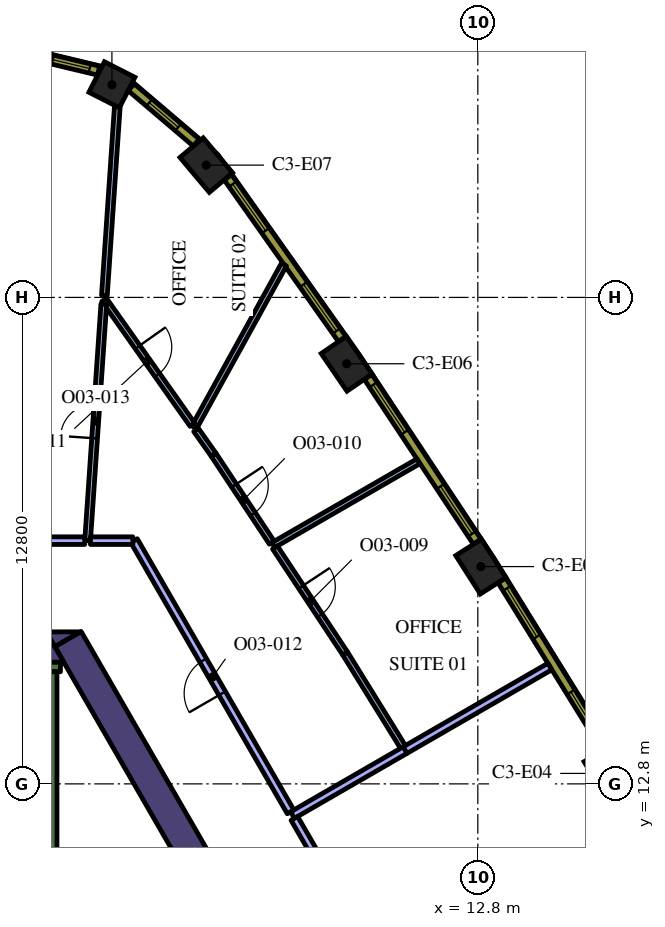
"""IFC4 building model, lengths in metres.
Left out: names, types, materials, properties, quantities, classifications, styles, units other than length and angle.
Written with IfcOpenShell. Run it as: python <this file> out.ifc"""

import sys

from ifc_helpers import new_model, si_unit, direction, frame, frame_2d, origin, origin_2d, place, context, subcontext, project, spatial, polyline, rectangle, outline, extrude, element, fill, save


model = new_model("IFC4")
c1 = context("Model", 3, precision=1e-05, world=origin(), true_north=direction((0.0, 1.0)))
c2 = subcontext(c1, "Body", "Model", "MODEL_VIEW")
j1 = project(units=[si_unit("LENGTHUNIT", "METRE"), si_unit("PLANEANGLEUNIT", "RADIAN")], contexts=[c1])
p1 = place(None, origin())
s1 = spatial("IfcSite", under=j1, at=p1, CompositionType="ELEMENT")
p2 = place(p1, origin())
s2 = spatial("IfcBuilding", under=s1, at=p2, CompositionType="ELEMENT")
p3 = place(p2, frame((0.0, 0.0, 171.0)))
s3 = spatial("IfcBuildingStorey", under=s2, at=p3, CompositionType="ELEMENT", Elevation=171.0)
for number, where, z_axis, x_axis in (
    (1, (16.247, 13.075, 0.0), (0.0, 0.0, 1.0), (-0.513, 0.858, 0.0)),
    (2, (12.88, 18.517, 0.0), (0.0, 0.0, 1.0), (-0.539, 0.842, 0.0)),
    (3, (9.348, 23.854, 0.0), (0.0, 0.0, 1.0), (-0.565, 0.825, 0.0)),
    (4, (5.654, 29.081, 0.0), (0.0, 0.0, 1.0), (-0.644, 0.765, 0.0)),
):
    element("IfcColumn", number, at=place(p3, frame(where, z_axis=z_axis, x_axis=x_axis)), inside=s3, PredefinedType="COLUMN", context=c2, shape_type="SweptSolid", body=[
        extrude(rectangle(XDim=1.2, YDim=0.8, at=origin_2d()), origin(), (0.0, 0.0, 1.0), 4.2),
    ])
p4 = place(p3, frame((3.171, 31.195, 0.0), z_axis=(0.0, 0.0, 1.0), x_axis=(-0.891486197647, 0.453047855535, 0.0)))
e5 = element("IfcColumn", 5, at=p4, inside=s3, PredefinedType="COLUMN", context=c2, shape_type="SweptSolid", body=[
    extrude(rectangle(XDim=0.9, YDim=0.9, at=origin_2d()), origin(), (0.0, 0.0, 1.0), 4.2),
])
p5 = place(p3, frame((8.279, 5.761, 0.0), z_axis=(0.0, 0.0, 1.0), x_axis=(-0.500010359015, 0.866019422922, 0.0)))
e6 = element("IfcWall", 6, at=p5, inside=s3, PredefinedType="SOLIDWALL", context=c2, shape_type="SweptSolid", body=[
    extrude(rectangle(XDim=12.528, YDim=0.8, at=frame_2d((6.264, 0.0))), origin(), (0.0, 0.0, 1.0), 4.2),
])
p6 = place(p3, origin())
e7 = element("IfcWall", 7, at=p6, inside=s3, PredefinedType="SOLIDWALL", context=c2, shape_type="SweptSolid", body=[
    extrude(outline(polyline([(1.443, 16.8), (2.339, 16.8), (1.667, 16.412), (1.443, 16.8)])), origin(), (0.0, 0.0, 1.0), 4.2),
])
e8 = element("IfcWall", 8, at=p6, inside=s3, PredefinedType="SOLIDWALL", context=c2, shape_type="SweptSolid", body=[
    extrude(outline(polyline([(1.905, 16.0), (1.447, 16.0), (1.447, 16.793), (1.905, 16.0)])), origin(), (0.0, 0.0, 1.0), 4.2),
])
p7 = place(p3, frame((-1.817, 15.875, 0.0), z_axis=(0.0, 0.0, 1.0), x_axis=(1.0, 0.0, 0.0)))
e9 = element("IfcWall", 9, at=p7, inside=s3, PredefinedType="SOLIDWALL", context=c2, shape_type="SweptSolid", body=[
    extrude(rectangle(XDim=3.634, YDim=0.25, at=frame_2d((1.817, 0.0))), origin(), (0.0, 0.0, 1.0), 4.2),
])
p8 = place(p3, frame((1.6, 8.95, 0.0), z_axis=(0.0, 0.0, 1.0), x_axis=(0.0, 1.0, 0.0)))
e10 = element("IfcWall", 10, at=p8, inside=s3, PredefinedType="SOLIDWALL", context=c2, shape_type="SweptSolid", body=[
    extrude(rectangle(XDim=6.8, YDim=0.25, at=frame_2d((3.4, 0.0))), origin(), (0.0, 0.0, 1.0), 4.2),
])
p9 = place(p3, frame((10.879, 13.685, 0.0), z_axis=(0.0, 0.0, 1.0), x_axis=(0.866035177799, 0.499983070528, 0.0)))
e11 = element("IfcWall", 11, at=p9, inside=s3, PredefinedType="PARTITIONING", context=c2, shape_type="SweptSolid", body=[
    extrude(rectangle(XDim=4.406, YDim=0.2, at=frame_2d((2.203, 0.0))), origin(), (0.0, 0.0, 1.0), 3.15),
])
p10 = place(p3, frame((7.922, 11.978, 0.0), z_axis=(0.0, 0.0, 1.0), x_axis=(0.866008564848, 0.50002916476, 0.0)))
e12 = element("IfcWall", 12, at=p10, inside=s3, PredefinedType="PARTITIONING", context=c2, shape_type="SweptSolid", body=[
    extrude(rectangle(XDim=3.422, YDim=0.2, at=frame_2d((1.711, 0.0))), origin(), (0.0, 0.0, 1.0), 3.15),
])
p11 = place(p3, frame((9.111, 9.918, 0.0), z_axis=(0.0, 0.0, 1.0), x_axis=(-0.499954382462, 0.86605173948, 0.0)))
e13 = element("IfcWall", 13, at=p11, inside=s3, PredefinedType="PARTITIONING", context=c2, shape_type="SweptSolid", body=[
    extrude(rectangle(XDim=2.278, YDim=0.2, at=frame_2d((1.139, 0.0))), origin(), (0.0, 0.0, 1.0), 3.15),
])
p12 = place(p3, frame((7.42, 19.085, 0.0), z_axis=(0.0, 0.0, 1.0), x_axis=(0.866012184407, 0.500022895934, 0.0)))
e14 = element("IfcWall", 14, at=p12, inside=s3, PredefinedType="PARTITIONING", context=c2, shape_type="SweptSolid", body=[
    extrude(rectangle(XDim=4.408, YDim=0.15, at=frame_2d((2.204, 0.0))), origin(), (0.0, 0.0, 1.0), 3.15),
])
p13 = place(p3, frame((10.83, 13.772, 0.0), z_axis=(0.0, 0.0, 1.0), x_axis=(-0.526229630206, 0.850342505284, 0.0)))
e15 = element("IfcWall", 15, at=p13, inside=s3, PredefinedType="PARTITIONING", context=c2, shape_type="SweptSolid", body=[
    extrude(rectangle(XDim=2.892, YDim=0.15, at=frame_2d((1.446, 0.0))), origin(), (0.0, 0.0, 1.0), 3.15),
])
p14 = place(p3, frame((7.461, 19.022, 0.0), z_axis=(0.0, 0.0, 1.0), x_axis=(0.551902709159, -0.833908507945, 0.0)))
e16 = element("IfcWall", 16, at=p14, inside=s3, PredefinedType="PARTITIONING", context=c2, shape_type="SweptSolid", body=[
    extrude(rectangle(XDim=3.347, YDim=0.15, at=frame_2d((1.673, 0.0))), origin(), (0.0, 0.0, 1.0), 3.15),
])
p15 = place(p14, frame((1.247, 0.0, 0.0)))
e17 = element("IfcOpeningElement", 17, at=p15, cuts=e16, PredefinedType="OPENING", context=c2, shape_type="SweptSolid", body=[
    extrude(rectangle(XDim=0.9, YDim=2.1, at=frame_2d((0.45, 1.05))), frame((0.0, 0.085, 0.0), z_axis=(0.0, -1.0, 0.0), x_axis=(1.0, 0.0, 0.0)), (0.0, 0.0, 1.0), 0.17),
])
p16 = place(p3, frame((5.337, 22.183, 0.0), z_axis=(0.0, 0.0, 1.0), x_axis=(0.482995509385, 0.875622828571, 0.0)))
e18 = element("IfcWall", 18, at=p16, inside=s3, PredefinedType="PARTITIONING", context=c2, shape_type="SweptSolid", body=[
    extrude(rectangle(XDim=4.89, YDim=0.15, at=frame_2d((2.445, 0.0))), origin(), (0.0, 0.0, 1.0), 3.15),
])
p17 = place(p3, frame((5.848, 21.46, 0.0), z_axis=(0.0, 0.0, 1.0), x_axis=(0.551934419249, -0.833887520502, 0.0)))
e19 = element("IfcWall", 19, at=p17, inside=s3, PredefinedType="PARTITIONING", context=c2, shape_type="SweptSolid", body=[
    extrude(rectangle(XDim=2.773, YDim=0.15, at=frame_2d((1.387, 0.0))), origin(), (0.0, 0.0, 1.0), 3.15),
])
p18 = place(p17, frame((0.973, 0.0, 0.0)))
e20 = element("IfcOpeningElement", 20, at=p18, cuts=e19, PredefinedType="OPENING", context=c2, shape_type="SweptSolid", body=[
    extrude(rectangle(XDim=0.9, YDim=2.1, at=frame_2d((0.45, 1.05))), frame((0.0, 0.085, 0.0), z_axis=(0.0, -1.0, 0.0), x_axis=(1.0, 0.0, 0.0)), (0.0, 0.0, 1.0), 0.17),
])
p19 = place(p3, frame((5.848, 21.46, 0.0), z_axis=(0.0, 0.0, 1.0), x_axis=(-0.577113333385, 0.816664068286, 0.0)))
e21 = element("IfcWall", 21, at=p19, inside=s3, PredefinedType="PARTITIONING", context=c2, shape_type="SweptSolid", body=[
    extrude(rectangle(XDim=0.802, YDim=0.15, at=frame_2d((0.401, 0.0))), origin(), (0.0, 0.0, 1.0), 3.15),
])
p20 = place(p3, frame((2.966, 25.539, 0.0), z_axis=(0.0, 0.0, 1.0), x_axis=(0.577099839594, -0.816673603798, 0.0)))
e22 = element("IfcWall", 22, at=p20, inside=s3, PredefinedType="PARTITIONING", context=c2, shape_type="SweptSolid", body=[
    extrude(rectangle(XDim=4.025, YDim=0.15, at=frame_2d((2.013, 0.0))), origin(), (0.0, 0.0, 1.0), 3.15),
])
p21 = place(p20, frame((1.525, 0.0, 0.0)))
e23 = element("IfcOpeningElement", 23, at=p21, cuts=e22, PredefinedType="OPENING", context=c2, shape_type="SweptSolid", body=[
    extrude(rectangle(XDim=0.9, YDim=2.1, at=frame_2d((0.45, 1.05))), frame((0.0, 0.085, 0.0), z_axis=(0.0, -1.0, 0.0), x_axis=(1.0, 0.0, 0.0)), (0.0, 0.0, 1.0), 0.17),
])
p22 = place(p3, frame((2.974, 25.657, 0.0), z_axis=(0.0, 0.0, 1.0), x_axis=(0.068301586051, 0.997664719905, 0.0)))
e24 = element("IfcWall", 24, at=p22, inside=s3, PredefinedType="PARTITIONING", context=c2, shape_type="SweptSolid", body=[
    extrude(rectangle(XDim=4.972, YDim=0.15, at=frame_2d((2.486, 0.0))), origin(), (0.0, 0.0, 1.0), 3.15),
])
p23 = place(p3, frame((2.531, 19.2, 0.0), z_axis=(0.0, 0.0, 1.0), x_axis=(0.06832771358, 0.997662930832, 0.0)))
e25 = element("IfcWall", 25, at=p23, inside=s3, PredefinedType="PARTITIONING", context=c2, shape_type="SweptSolid", body=[
    extrude(rectangle(XDim=6.235, YDim=0.15, at=frame_2d((3.118, 0.0))), origin(), (0.0, 0.0, 1.0), 3.15),
])
p24 = place(p23, frame((2.7, 0.0, 0.0)))
e26 = element("IfcOpeningElement", 26, at=p24, cuts=e25, PredefinedType="OPENING", context=c2, shape_type="SweptSolid", body=[
    extrude(rectangle(XDim=0.9, YDim=2.1, at=frame_2d((0.45, 1.05))), frame((0.0, 0.085, 0.0), z_axis=(0.0, -1.0, 0.0), x_axis=(1.0, 0.0, 0.0)), (0.0, 0.0, 1.0), 0.17),
])
p25 = place(p3, frame((7.872, 12.064, 0.0), z_axis=(0.0, 0.0, 1.0), x_axis=(-0.499995192696, 0.866028179265, 0.0)))
e27 = element("IfcWall", 27, at=p25, inside=s3, PredefinedType="PARTITIONING", context=c2, shape_type="SweptSolid", body=[
    extrude(rectangle(XDim=8.239, YDim=0.2, at=frame_2d((4.12, 0.0))), origin(), (0.0, 0.0, 1.0), 3.15),
])
p26 = place(p25, frame((3.6, 0.0, 0.0)))
e28 = element("IfcOpeningElement", 28, at=p26, cuts=e27, PredefinedType="OPENING", context=c2, shape_type="SweptSolid", body=[
    extrude(rectangle(XDim=1.0, YDim=2.1, at=frame_2d((0.5, 1.05))), frame((0.0, 0.11, 0.0), z_axis=(0.0, -1.0, 0.0), x_axis=(1.0, 0.0, 0.0)), (0.0, 0.0, 1.0), 0.22),
])
p27 = place(p3, frame((3.723, 19.2, 0.0), z_axis=(0.0, 0.0, 1.0), x_axis=(-1.0, 0.0, 0.0)))
e29 = element("IfcWall", 29, at=p27, inside=s3, PredefinedType="PARTITIONING", context=c2, shape_type="SweptSolid", body=[
    extrude(rectangle(XDim=1.116, YDim=0.2, at=frame_2d((0.558, 0.0))), origin(), (0.0, 0.0, 1.0), 3.15),
])
p28 = place(p3, frame((2.456, 19.2, 0.0), z_axis=(0.0, 0.0, 1.0), x_axis=(-1.0, 0.0, 0.0)))
e30 = element("IfcWall", 30, at=p28, inside=s3, PredefinedType="PARTITIONING", context=c2, shape_type="SweptSolid", body=[
    extrude(rectangle(XDim=5.41, YDim=0.2, at=frame_2d((2.705, 0.0))), origin(), (0.0, 0.0, 1.0), 3.15),
])
p29 = place(p3, frame((16.171, 13.731, 0.0), z_axis=(0.0, 0.0, 1.0), x_axis=(-0.526197926587, 0.850362124072, 0.0)))
e31 = element("IfcWall", 31, at=p29, inside=s3, PredefinedType="SOLIDWALL", context=c2, shape_type="SweptSolid", body=[
    extrude(rectangle(XDim=5.203, YDim=0.24, at=frame_2d((2.602, 0.0))), origin(), (0.0, 0.0, 1.0), 3.95),
])
p30 = place(p29, frame((0.248, 0.0, 0.9)))
e32 = element("IfcOpeningElement", 32, at=p30, cuts=e31, PredefinedType="OPENING", context=c2, shape_type="SweptSolid", body=[
    extrude(rectangle(XDim=1.5, YDim=2.55, at=frame_2d((0.75, 1.275))), frame((0.0, 0.13, 0.0), z_axis=(0.0, -1.0, 0.0), x_axis=(1.0, 0.0, 0.0)), (0.0, 0.0, 1.0), 0.26),
])
p31 = place(p29, frame((3.455, 0.0, 0.9)))
e33 = element("IfcOpeningElement", 33, at=p31, cuts=e31, PredefinedType="OPENING", context=c2, shape_type="SweptSolid", body=[
    extrude(rectangle(XDim=1.5, YDim=2.55, at=frame_2d((0.75, 1.275))), frame((0.0, 0.13, 0.0), z_axis=(0.0, -1.0, 0.0), x_axis=(1.0, 0.0, 0.0)), (0.0, 0.0, 1.0), 0.26),
])
p32 = place(p3, frame((12.783, 19.171, 0.0), z_axis=(0.0, 0.0, 1.0), x_axis=(-0.551892811511, 0.833915058386, 0.0)))
e34 = element("IfcWall", 34, at=p32, inside=s3, PredefinedType="SOLIDWALL", context=c2, shape_type="SweptSolid", body=[
    extrude(rectangle(XDim=5.204, YDim=0.24, at=frame_2d((2.602, 0.0))), origin(), (0.0, 0.0, 1.0), 3.95),
])
p33 = place(p32, frame((0.248, 0.0, 0.9)))
e35 = element("IfcOpeningElement", 35, at=p33, cuts=e34, PredefinedType="OPENING", context=c2, shape_type="SweptSolid", body=[
    extrude(rectangle(XDim=1.5, YDim=2.55, at=frame_2d((0.75, 1.275))), frame((0.0, 0.13, 0.0), z_axis=(0.0, -1.0, 0.0), x_axis=(1.0, 0.0, 0.0)), (0.0, 0.0, 1.0), 0.26),
])
p34 = place(p32, frame((3.455, 0.0, 0.9)))
e36 = element("IfcOpeningElement", 36, at=p34, cuts=e34, PredefinedType="OPENING", context=c2, shape_type="SweptSolid", body=[
    extrude(rectangle(XDim=1.5, YDim=2.55, at=frame_2d((0.75, 1.275))), frame((0.0, 0.13, 0.0), z_axis=(0.0, -1.0, 0.0), x_axis=(1.0, 0.0, 0.0)), (0.0, 0.0, 1.0), 0.26),
])
p35 = place(p3, frame((9.231, 24.504, 0.0), z_axis=(0.0, 0.0, 1.0), x_axis=(-0.577115207679, 0.816662743772, 0.0)))
e37 = element("IfcWall", 37, at=p35, inside=s3, PredefinedType="SOLIDWALL", context=c2, shape_type="SweptSolid", body=[
    extrude(rectangle(XDim=5.213, YDim=0.24, at=frame_2d((2.606, 0.0))), origin(), (0.0, 0.0, 1.0), 3.95),
])
p36 = place(p35, frame((0.261, 0.0, 0.9)))
e38 = element("IfcOpeningElement", 38, at=p36, cuts=e37, PredefinedType="OPENING", context=c2, shape_type="SweptSolid", body=[
    extrude(rectangle(XDim=1.5, YDim=2.55, at=frame_2d((0.75, 1.275))), frame((0.0, 0.13, 0.0), z_axis=(0.0, -1.0, 0.0), x_axis=(1.0, 0.0, 0.0)), (0.0, 0.0, 1.0), 0.26),
])
p37 = place(p35, frame((3.492, 0.0, 0.9)))
e39 = element("IfcOpeningElement", 39, at=p37, cuts=e37, PredefinedType="OPENING", context=c2, shape_type="SweptSolid", body=[
    extrude(rectangle(XDim=1.5, YDim=2.55, at=frame_2d((0.75, 1.275))), frame((0.0, 0.13, 0.0), z_axis=(0.0, -1.0, 0.0), x_axis=(1.0, 0.0, 0.0)), (0.0, 0.0, 1.0), 0.26),
])
p38 = place(p3, frame((5.392, 29.672, 0.0), z_axis=(0.0, 0.0, 1.0), x_axis=(-0.761419744247, 0.648259186645, 0.0)))
e40 = element("IfcWall", 40, at=p38, inside=s3, PredefinedType="SOLIDWALL", context=c2, shape_type="SweptSolid", body=[
    extrude(rectangle(XDim=2.25, YDim=0.24, at=frame_2d((1.125, 0.0))), origin(), (0.0, 0.0, 1.0), 3.95),
])
p39 = place(p38, frame((0.625, 0.0, 0.9)))
e41 = element("IfcOpeningElement", 41, at=p39, cuts=e40, PredefinedType="OPENING", context=c2, shape_type="SweptSolid", body=[
    extrude(rectangle(XDim=1.0, YDim=2.55, at=frame_2d((0.5, 1.275))), frame((0.0, 0.13, 0.0), z_axis=(0.0, -1.0, 0.0), x_axis=(1.0, 0.0, 0.0)), (0.0, 0.0, 1.0), 0.26),
])
p40 = place(p3, frame((2.821, 31.566, 0.0), z_axis=(0.0, 0.0, 1.0), x_axis=(-0.972479955788, 0.232986556673, 0.0)))
e42 = element("IfcWall", 42, at=p40, inside=s3, PredefinedType="SOLIDWALL", context=c2, shape_type="SweptSolid", body=[
    extrude(rectangle(XDim=1.482, YDim=0.24, at=frame_2d((0.741, 0.0))), origin(), (0.0, 0.0, 1.0), 3.95),
])
p41 = place(p40, frame((0.241, 0.0, 0.9)))
e43 = element("IfcOpeningElement", 43, at=p41, cuts=e42, PredefinedType="OPENING", context=c2, shape_type="SweptSolid", body=[
    extrude(rectangle(XDim=1.0, YDim=2.55, at=frame_2d((0.5, 1.275))), frame((0.0, 0.13, 0.0), z_axis=(0.0, -1.0, 0.0), x_axis=(1.0, 0.0, 0.0)), (0.0, 0.0, 1.0), 0.26),
])
p42 = place(p15, origin())
e44 = element("IfcDoor", 44, at=p42, inside=s3, OperationType="SINGLE_SWING_RIGHT", PredefinedType="DOOR", context=c2, shape_type="SweptSolid", body=[
    extrude(rectangle(XDim=0.9, YDim=2.1, at=frame_2d((0.45, 1.05))), frame((0.0, 0.025, 0.0), z_axis=(0.0, -1.0, 0.0), x_axis=(1.0, 0.0, 0.0)), (0.0, 0.0, 1.0), 0.05),
])
fill(e17, e44)
p43 = place(p18, origin())
e45 = element("IfcDoor", 45, at=p43, inside=s3, OperationType="SINGLE_SWING_RIGHT", PredefinedType="DOOR", context=c2, shape_type="SweptSolid", body=[
    extrude(rectangle(XDim=0.9, YDim=2.1, at=frame_2d((0.45, 1.05))), frame((0.0, 0.025, 0.0), z_axis=(0.0, -1.0, 0.0), x_axis=(1.0, 0.0, 0.0)), (0.0, 0.0, 1.0), 0.05),
])
fill(e20, e45)
p44 = place(p21, origin())
e46 = element("IfcDoor", 46, at=p44, inside=s3, OperationType="SINGLE_SWING_LEFT", PredefinedType="DOOR", context=c2, shape_type="SweptSolid", body=[
    extrude(rectangle(XDim=0.9, YDim=2.1, at=frame_2d((0.45, 1.05))), frame((0.0, 0.025, 0.0), z_axis=(0.0, -1.0, 0.0), x_axis=(1.0, 0.0, 0.0)), (0.0, 0.0, 1.0), 0.05),
])
fill(e23, e46)
p45 = place(p26, origin())
e47 = element("IfcDoor", 47, at=p45, inside=s3, OperationType="SINGLE_SWING_LEFT", PredefinedType="DOOR", context=c2, shape_type="SweptSolid", body=[
    extrude(rectangle(XDim=1.0, YDim=2.1, at=frame_2d((0.5, 1.05))), frame((0.0, 0.025, 0.0), z_axis=(0.0, -1.0, 0.0), x_axis=(1.0, 0.0, 0.0)), (0.0, 0.0, 1.0), 0.05),
])
fill(e28, e47)
p46 = place(p24, origin())
e48 = element("IfcDoor", 48, at=p46, inside=s3, OperationType="SINGLE_SWING_RIGHT", PredefinedType="DOOR", context=c2, shape_type="SweptSolid", body=[
    extrude(rectangle(XDim=0.9, YDim=2.1, at=frame_2d((0.45, 1.05))), frame((0.0, 0.025, 0.0), z_axis=(0.0, -1.0, 0.0), x_axis=(1.0, 0.0, 0.0)), (0.0, 0.0, 1.0), 0.05),
])
fill(e26, e48)
p47 = place(p30, origin())
e49 = element("IfcWindow", 49, at=p47, inside=s3, PartitioningType="SINGLE_PANEL", PredefinedType="WINDOW", context=c2, shape_type="SweptSolid", body=[
    extrude(rectangle(XDim=1.5, YDim=2.55, at=frame_2d((0.75, 1.275))), frame((0.0, 0.04, 0.0), z_axis=(0.0, -1.0, 0.0), x_axis=(1.0, 0.0, 0.0)), (0.0, 0.0, 1.0), 0.06),
])
fill(e32, e49)
p48 = place(p31, origin())
e50 = element("IfcWindow", 50, at=p48, inside=s3, PartitioningType="SINGLE_PANEL", PredefinedType="WINDOW", context=c2, shape_type="SweptSolid", body=[
    extrude(rectangle(XDim=1.5, YDim=2.55, at=frame_2d((0.75, 1.275))), frame((0.0, 0.04, 0.0), z_axis=(0.0, -1.0, 0.0), x_axis=(1.0, 0.0, 0.0)), (0.0, 0.0, 1.0), 0.06),
])
fill(e33, e50)
p49 = place(p33, origin())
e51 = element("IfcWindow", 51, at=p49, inside=s3, PartitioningType="SINGLE_PANEL", PredefinedType="WINDOW", context=c2, shape_type="SweptSolid", body=[
    extrude(rectangle(XDim=1.5, YDim=2.55, at=frame_2d((0.75, 1.275))), frame((0.0, 0.04, 0.0), z_axis=(0.0, -1.0, 0.0), x_axis=(1.0, 0.0, 0.0)), (0.0, 0.0, 1.0), 0.06),
])
fill(e35, e51)
p50 = place(p34, origin())
e52 = element("IfcWindow", 52, at=p50, inside=s3, PartitioningType="SINGLE_PANEL", PredefinedType="WINDOW", context=c2, shape_type="SweptSolid", body=[
    extrude(rectangle(XDim=1.5, YDim=2.55, at=frame_2d((0.75, 1.275))), frame((0.0, 0.04, 0.0), z_axis=(0.0, -1.0, 0.0), x_axis=(1.0, 0.0, 0.0)), (0.0, 0.0, 1.0), 0.06),
])
fill(e36, e52)
p51 = place(p36, origin())
e53 = element("IfcWindow", 53, at=p51, inside=s3, PartitioningType="SINGLE_PANEL", PredefinedType="WINDOW", context=c2, shape_type="SweptSolid", body=[
    extrude(rectangle(XDim=1.5, YDim=2.55, at=frame_2d((0.75, 1.275))), frame((0.0, 0.04, 0.0), z_axis=(0.0, -1.0, 0.0), x_axis=(1.0, 0.0, 0.0)), (0.0, 0.0, 1.0), 0.06),
])
fill(e38, e53)
p52 = place(p37, origin())
e54 = element("IfcWindow", 54, at=p52, inside=s3, PartitioningType="SINGLE_PANEL", PredefinedType="WINDOW", context=c2, shape_type="SweptSolid", body=[
    extrude(rectangle(XDim=1.5, YDim=2.55, at=frame_2d((0.75, 1.275))), frame((0.0, 0.04, 0.0), z_axis=(0.0, -1.0, 0.0), x_axis=(1.0, 0.0, 0.0)), (0.0, 0.0, 1.0), 0.06),
])
fill(e39, e54)
p53 = place(p39, origin())
e55 = element("IfcWindow", 55, at=p53, inside=s3, PartitioningType="SINGLE_PANEL", PredefinedType="WINDOW", context=c2, shape_type="SweptSolid", body=[
    extrude(rectangle(XDim=1.0, YDim=2.55, at=frame_2d((0.5, 1.275))), frame((0.0, 0.04, 0.0), z_axis=(0.0, -1.0, 0.0), x_axis=(1.0, 0.0, 0.0)), (0.0, 0.0, 1.0), 0.06),
])
fill(e41, e55)
p54 = place(p41, origin())
e56 = element("IfcWindow", 56, at=p54, inside=s3, PartitioningType="SINGLE_PANEL", PredefinedType="WINDOW", context=c2, shape_type="SweptSolid", body=[
    extrude(rectangle(XDim=1.0, YDim=2.55, at=frame_2d((0.5, 1.275))), frame((0.0, 0.04, 0.0), z_axis=(0.0, -1.0, 0.0), x_axis=(1.0, 0.0, 0.0)), (0.0, 0.0, 1.0), 0.06),
])
fill(e43, e56)
save(model, sys.argv[1])
